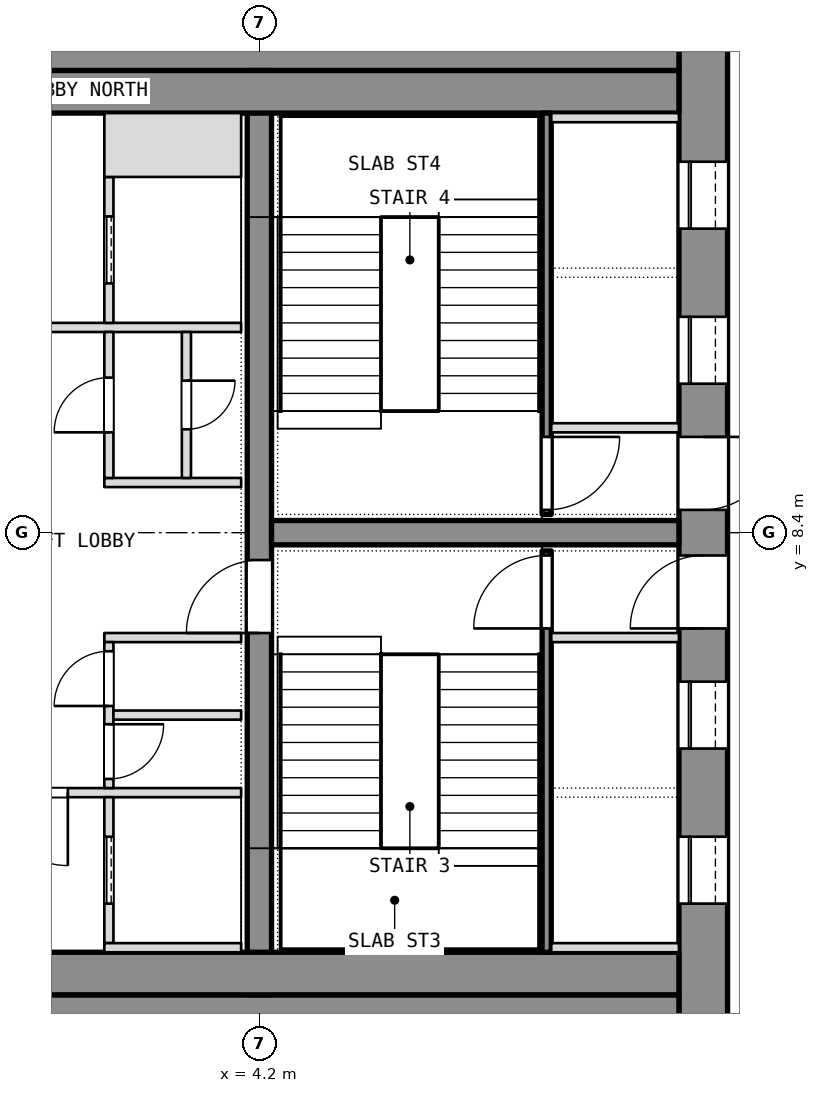
"""IFC4 building model, lengths in metres.
Left out: names, types, materials, properties, quantities, classifications, styles, units other than length and angle.
Written with IfcOpenShell. Run it as: python <this file> out.ifc"""

import sys

from ifc_helpers import new_model, si_unit, direction, frame, frame_2d, origin, place, context, subcontext, project, spatial, rectangle, extrude, element, fill, save


model = new_model("IFC4")
c1 = context("Model", 3, precision=1e-05, world=origin(), true_north=direction((0.0, 1.0)))
c2 = subcontext(c1, "Body", "Model", "MODEL_VIEW")
j1 = project(units=[si_unit("LENGTHUNIT", "METRE"), si_unit("PLANEANGLEUNIT", "RADIAN")], contexts=[c1])
p1 = place(None, origin())
s1 = spatial("IfcSite", under=j1, at=p1, CompositionType="ELEMENT")
p2 = place(p1, origin())
s2 = spatial("IfcBuilding", under=s1, at=p2, CompositionType="ELEMENT")
p3 = place(p2, frame((0.0, 0.0, 220.1)))
s3 = spatial("IfcBuildingStorey", under=s2, at=p3, CompositionType="ELEMENT", Elevation=220.1)
p4 = place(p3, frame((11.5, 0.0, 0.0), z_axis=(0.0, 0.0, 1.0), x_axis=(0.0, 1.0, 0.0)))
e1 = element("IfcWall", 1, at=p4, inside=s3, PredefinedType="SHEAR", context=c2, shape_type="SweptSolid", body=[
    extrude(rectangle(XDim=16.8, YDim=0.8, at=frame_2d((8.4, 0.0))), origin(), (0.0, 0.0, 1.0), 3.6),
])
p5 = place(p4, frame((2.3, 0.0, 0.0)))
e2 = element("IfcOpeningElement", 2, at=p5, cuts=e1, PredefinedType="OPENING", context=c2, shape_type="SweptSolid", body=[
    extrude(rectangle(XDim=1.1, YDim=2.1, at=frame_2d((0.55, 1.05))), frame((0.0, 0.4, 0.0), z_axis=(0.0, -1.0, 0.0), x_axis=(1.0, 0.0, 0.0)), (0.0, 0.0, 1.0), 0.8),
])
p6 = place(p4, frame((4.85, 0.0, 0.0)))
e3 = element("IfcOpeningElement", 3, at=p6, cuts=e1, PredefinedType="OPENING", context=c2, shape_type="SweptSolid", body=[
    extrude(rectangle(XDim=1.1, YDim=2.1, at=frame_2d((0.55, 1.05))), frame((0.0, 0.4, 0.0), z_axis=(0.0, -1.0, 0.0), x_axis=(1.0, 0.0, 0.0)), (0.0, 0.0, 1.0), 0.8),
])
p7 = place(p4, frame((6.825, 0.0, 0.0)))
e4 = element("IfcOpeningElement", 4, at=p7, cuts=e1, PredefinedType="OPENING", context=c2, shape_type="SweptSolid", body=[
    extrude(rectangle(XDim=1.2, YDim=2.1, at=frame_2d((0.6, 1.05))), frame((0.0, 0.4, 0.0), z_axis=(0.0, -1.0, 0.0), x_axis=(1.0, 0.0, 0.0)), (0.0, 0.0, 1.0), 0.8),
])
p8 = place(p4, frame((13.4, 0.0, 0.0)))
e5 = element("IfcOpeningElement", 5, at=p8, cuts=e1, PredefinedType="OPENING", context=c2, shape_type="SweptSolid", body=[
    extrude(rectangle(XDim=1.1, YDim=2.1, at=frame_2d((0.55, 1.05))), frame((0.0, 0.4, 0.0), z_axis=(0.0, -1.0, 0.0), x_axis=(1.0, 0.0, 0.0)), (0.0, 0.0, 1.0), 0.8),
])
p9 = place(p4, frame((10.85, 0.0, 0.0)))
e6 = element("IfcOpeningElement", 6, at=p9, cuts=e1, PredefinedType="OPENING", context=c2, shape_type="SweptSolid", body=[
    extrude(rectangle(XDim=1.1, YDim=2.1, at=frame_2d((0.55, 1.05))), frame((0.0, 0.4, 0.0), z_axis=(0.0, -1.0, 0.0), x_axis=(1.0, 0.0, 0.0)), (0.0, 0.0, 1.0), 0.8),
])
p10 = place(p4, frame((8.775, 0.0, 0.0)))
e7 = element("IfcOpeningElement", 7, at=p10, cuts=e1, PredefinedType="OPENING", context=c2, shape_type="SweptSolid", body=[
    extrude(rectangle(XDim=1.2, YDim=2.1, at=frame_2d((0.6, 1.05))), frame((0.0, 0.4, 0.0), z_axis=(0.0, -1.0, 0.0), x_axis=(1.0, 0.0, 0.0)), (0.0, 0.0, 1.0), 0.8),
])
for number, where, z_axis, x_axis in (
    (8, (-11.1, 0.4, 0.0), (0.0, 0.0, 1.0), (1.0, 0.0, 0.0)),
    (9, (-11.1, 16.4, 0.0), (0.0, 0.0, 1.0), (1.0, 0.0, 0.0)),
):
    element("IfcWall", number, at=place(p3, frame(where, z_axis=z_axis, x_axis=x_axis)), inside=s3, PredefinedType="SHEAR", context=c2, shape_type="SweptSolid", body=[
        extrude(rectangle(XDim=22.2, YDim=0.8, at=frame_2d((11.1, 0.0))), origin(), (0.0, 0.0, 1.0), 3.6),
    ])
p11 = place(p3, frame((4.2, 0.8, 0.0), z_axis=(0.0, 0.0, 1.0), x_axis=(0.0, 1.0, 0.0)))
e10 = element("IfcWall", 10, at=p11, inside=s3, PredefinedType="SHEAR", context=c2, shape_type="SweptSolid", body=[
    extrude(rectangle(XDim=15.2, YDim=0.4, at=frame_2d((7.6, 0.0))), origin(), (0.0, 0.0, 1.0), 3.6),
])
p12 = place(p11, frame((5.95, 0.0, 0.0)))
e11 = element("IfcOpeningElement", 11, at=p12, cuts=e10, PredefinedType="OPENING", context=c2, shape_type="SweptSolid", body=[
    extrude(rectangle(XDim=1.2, YDim=2.1, at=frame_2d((0.6, 1.05))), frame((0.0, 0.2, 0.0), z_axis=(0.0, -1.0, 0.0), x_axis=(1.0, 0.0, 0.0)), (0.0, 0.0, 1.0), 0.4),
])
p13 = place(p3, frame((4.4, 8.4, 0.0), z_axis=(0.0, 0.0, 1.0), x_axis=(1.0, 0.0, 0.0)))
e12 = element("IfcWall", 12, at=p13, inside=s3, PredefinedType="SHEAR", context=c2, shape_type="SweptSolid", body=[
    extrude(rectangle(XDim=6.7, YDim=0.4, at=frame_2d((3.35, 0.0))), origin(), (0.0, 0.0, 1.0), 3.6),
])
for number, where, z_axis, x_axis in (
    (13, (-11.1, 1.15, 0.0), (0.0, 0.0, 1.0), (1.0, 0.0, 0.0)),
    (14, (-11.1, 15.65, 0.0), (0.0, 0.0, 1.0), (1.0, 0.0, 0.0)),
):
    element("IfcWall", number, at=place(p3, frame(where, z_axis=z_axis, x_axis=x_axis)), inside=s3, PredefinedType="PARTITIONING", context=c2, shape_type="SweptSolid", body=[
        extrude(rectangle(XDim=22.2, YDim=0.7, at=frame_2d((11.1, 0.0))), origin(), (0.0, 0.0, 1.0), 3.34),
    ])
p14 = place(p3, frame((8.925, 1.5, 0.0), z_axis=(0.0, 0.0, 1.0), x_axis=(0.0, 1.0, 0.0)))
e15 = element("IfcWall", 15, at=p14, inside=s3, PredefinedType="SHEAR", context=c2, shape_type="SweptSolid", body=[
    extrude(rectangle(XDim=6.6, YDim=0.15, at=frame_2d((3.3, 0.0))), origin(), (0.0, 0.0, 1.0), 3.34),
])
p15 = place(p14, frame((5.325, 0.0, 0.0)))
e16 = element("IfcOpeningElement", 16, at=p15, cuts=e15, PredefinedType="OPENING", context=c2, shape_type="SweptSolid", body=[
    extrude(rectangle(XDim=1.2, YDim=2.1, at=frame_2d((0.6, 1.05))), frame((0.0, 0.075, 0.0), z_axis=(0.0, -1.0, 0.0), x_axis=(1.0, 0.0, 0.0)), (0.0, 0.0, 1.0), 0.15),
])
for number, where, z_axis, x_axis in (
    (17, (9.0, 6.675, 0.0), (0.0, 0.0, 1.0), (1.0, 0.0, 0.0)),
    (18, (9.0, 1.575, 0.0), (0.0, 0.0, 1.0), (1.0, 0.0, 0.0)),
):
    element("IfcWall", number, at=place(p3, frame(where, z_axis=z_axis, x_axis=x_axis)), inside=s3, PredefinedType="SHEAR", context=c2, shape_type="SweptSolid", body=[
        extrude(rectangle(XDim=2.1, YDim=0.15, at=frame_2d((1.05, 0.0))), origin(), (0.0, 0.0, 1.0), 3.6),
    ])
p16 = place(p3, frame((8.925, 8.7, 0.0), z_axis=(0.0, 0.0, 1.0), x_axis=(0.0, 1.0, 0.0)))
e19 = element("IfcWall", 19, at=p16, inside=s3, PredefinedType="SHEAR", context=c2, shape_type="SweptSolid", body=[
    extrude(rectangle(XDim=6.6, YDim=0.15, at=frame_2d((3.3, 0.0))), origin(), (0.0, 0.0, 1.0), 3.34),
])
p17 = place(p16, frame((0.075, 0.0, 0.0)))
e20 = element("IfcOpeningElement", 20, at=p17, cuts=e19, PredefinedType="OPENING", context=c2, shape_type="SweptSolid", body=[
    extrude(rectangle(XDim=1.2, YDim=2.1, at=frame_2d((0.6, 1.05))), frame((0.0, 0.075, 0.0), z_axis=(0.0, -1.0, 0.0), x_axis=(1.0, 0.0, 0.0)), (0.0, 0.0, 1.0), 0.15),
])
for number, where, z_axis, x_axis in (
    (21, (9.0, 10.125, 0.0), (0.0, 0.0, 1.0), (1.0, 0.0, 0.0)),
    (22, (9.0, 15.225, 0.0), (0.0, 0.0, 1.0), (1.0, 0.0, 0.0)),
):
    element("IfcWall", number, at=place(p3, frame(where, z_axis=z_axis, x_axis=x_axis)), inside=s3, PredefinedType="SHEAR", context=c2, shape_type="SweptSolid", body=[
        extrude(rectangle(XDim=2.1, YDim=0.15, at=frame_2d((1.05, 0.0))), origin(), (0.0, 0.0, 1.0), 3.6),
    ])
p18 = place(p3, frame((-3.9, 4.125, 0.0), z_axis=(0.0, 0.0, 1.0), x_axis=(1.0, 0.0, 0.0)))
e23 = element("IfcWall", 23, at=p18, inside=s3, PredefinedType="PARTITIONING", context=c2, shape_type="SweptSolid", body=[
    extrude(rectangle(XDim=7.8, YDim=0.15, at=frame_2d((3.9, 0.0))), origin(), (0.0, 0.0, 1.0), 3.34),
])
p19 = place(p18, frame((3.75, 0.0, 0.0)))
e24 = element("IfcOpeningElement", 24, at=p19, cuts=e23, PredefinedType="OPENING", context=c2, shape_type="SweptSolid", body=[
    extrude(rectangle(XDim=1.2, YDim=2.1, at=frame_2d((0.6, 1.05))), frame((0.0, 0.075, 0.0), z_axis=(0.0, -1.0, 0.0), x_axis=(1.0, 0.0, 0.0)), (0.0, 0.0, 1.0), 0.15),
])
p20 = place(p3, frame((-3.9, 11.775, 0.0), z_axis=(0.0, 0.0, 1.0), x_axis=(1.0, 0.0, 0.0)))
e25 = element("IfcWall", 25, at=p20, inside=s3, PredefinedType="PARTITIONING", context=c2, shape_type="SweptSolid", body=[
    extrude(rectangle(XDim=7.8, YDim=0.15, at=frame_2d((3.9, 0.0))), origin(), (0.0, 0.0, 1.0), 3.34),
])
p21 = place(p20, frame((3.3, 0.0, 0.0)))
e26 = element("IfcOpeningElement", 26, at=p21, cuts=e25, PredefinedType="OPENING", context=c2, shape_type="SweptSolid", body=[
    extrude(rectangle(XDim=1.2, YDim=2.1, at=frame_2d((0.6, 1.05))), frame((0.0, 0.075, 0.0), z_axis=(0.0, -1.0, 0.0), x_axis=(1.0, 0.0, 0.0)), (0.0, 0.0, 1.0), 0.15),
])
p22 = place(p3, frame((1.725, 1.65, 0.0), z_axis=(0.0, 0.0, 1.0), x_axis=(0.0, 1.0, 0.0)))
e27 = element("IfcWall", 27, at=p22, inside=s3, PredefinedType="SHEAR", context=c2, shape_type="SweptSolid", body=[
    extrude(rectangle(XDim=2.4, YDim=0.15, at=frame_2d((1.2, 0.0))), origin(), (0.0, 0.0, 1.0), 3.6),
])
p23 = place(p22, frame((0.65, 0.0, 0.0)))
e28 = element("IfcOpeningElement", 28, at=p23, cuts=e27, PredefinedType="OPENING", context=c2, shape_type="SweptSolid", body=[
    extrude(rectangle(XDim=1.1, YDim=2.1, at=frame_2d((0.55, 1.05))), frame((0.0, 0.075, 0.0), z_axis=(0.0, -1.0, 0.0), x_axis=(1.0, 0.0, 0.0)), (0.0, 0.0, 1.0), 0.15),
])
p24 = place(p3, frame((1.65, 1.575, 0.0), z_axis=(0.0, 0.0, 1.0), x_axis=(1.0, 0.0, 0.0)))
e29 = element("IfcWall", 29, at=p24, inside=s3, PredefinedType="SHEAR", context=c2, shape_type="SweptSolid", body=[
    extrude(rectangle(XDim=2.25, YDim=0.15, at=frame_2d((1.125, 0.0))), origin(), (0.0, 0.0, 1.0), 3.6),
])
p25 = place(p3, frame((1.725, 11.85, 0.0), z_axis=(0.0, 0.0, 1.0), x_axis=(0.0, 1.0, 0.0)))
e30 = element("IfcWall", 30, at=p25, inside=s3, PredefinedType="SHEAR", context=c2, shape_type="SweptSolid", body=[
    extrude(rectangle(XDim=2.4, YDim=0.15, at=frame_2d((1.2, 0.0))), origin(), (0.0, 0.0, 1.0), 3.6),
])
p26 = place(p25, frame((0.65, 0.0, 0.0)))
e31 = element("IfcOpeningElement", 31, at=p26, cuts=e30, PredefinedType="OPENING", context=c2, shape_type="SweptSolid", body=[
    extrude(rectangle(XDim=1.1, YDim=2.1, at=frame_2d((0.55, 1.05))), frame((0.0, 0.075, 0.0), z_axis=(0.0, -1.0, 0.0), x_axis=(1.0, 0.0, 0.0)), (0.0, 0.0, 1.0), 0.15),
])
p27 = place(p3, frame((1.65, 14.775, 0.0), z_axis=(0.0, 0.0, 1.0), x_axis=(1.0, 0.0, 0.0)))
e32 = element("IfcWall", 32, at=p27, inside=s3, PredefinedType="SHEAR", context=c2, shape_type="SweptSolid", body=[
    extrude(rectangle(XDim=2.25, YDim=1.05, at=frame_2d((1.125, 0.0))), origin(), (0.0, 0.0, 1.0), 3.6),
])
for number, where, z_axis, x_axis in (
    (33, (1.65, 6.675, 0.0), (0.0, 0.0, 1.0), (1.0, 0.0, 0.0)),
    (34, (1.65, 9.225, 0.0), (0.0, 0.0, 1.0), (1.0, 0.0, 0.0)),
):
    element("IfcWall", number, at=place(p3, frame(where, z_axis=z_axis, x_axis=x_axis)), inside=s3, PredefinedType="PARTITIONING", context=c2, shape_type="SweptSolid", body=[
        extrude(rectangle(XDim=2.25, YDim=0.15, at=frame_2d((1.125, 0.0))), origin(), (0.0, 0.0, 1.0), 3.34),
    ])
p28 = place(p3, frame((1.725, 4.2, 0.0), z_axis=(0.0, 0.0, 1.0), x_axis=(0.0, 1.0, 0.0)))
e35 = element("IfcWall", 35, at=p28, inside=s3, PredefinedType="PARTITIONING", context=c2, shape_type="SweptSolid", body=[
    extrude(rectangle(XDim=2.4, YDim=0.15, at=frame_2d((1.2, 0.0))), origin(), (0.0, 0.0, 1.0), 3.34),
])
p29 = place(p28, frame((0.15, 0.0, 0.0)))
e36 = element("IfcOpeningElement", 36, at=p29, cuts=e35, PredefinedType="OPENING", context=c2, shape_type="SweptSolid", body=[
    extrude(rectangle(XDim=0.9, YDim=2.1, at=frame_2d((0.45, 1.05))), frame((0.0, 0.075, 0.0), z_axis=(0.0, -1.0, 0.0), x_axis=(1.0, 0.0, 0.0)), (0.0, 0.0, 1.0), 0.15),
])
p30 = place(p28, frame((1.35, 0.0, 0.0)))
e37 = element("IfcOpeningElement", 37, at=p30, cuts=e35, PredefinedType="OPENING", context=c2, shape_type="SweptSolid", body=[
    extrude(rectangle(XDim=0.9, YDim=2.1, at=frame_2d((0.45, 1.05))), frame((0.0, 0.075, 0.0), z_axis=(0.0, -1.0, 0.0), x_axis=(1.0, 0.0, 0.0)), (0.0, 0.0, 1.0), 0.15),
])
p31 = place(p3, frame((1.725, 9.3, 0.0), z_axis=(0.0, 0.0, 1.0), x_axis=(0.0, 1.0, 0.0)))
e38 = element("IfcWall", 38, at=p31, inside=s3, PredefinedType="PARTITIONING", context=c2, shape_type="SweptSolid", body=[
    extrude(rectangle(XDim=2.4, YDim=0.15, at=frame_2d((1.2, 0.0))), origin(), (0.0, 0.0, 1.0), 3.34),
])
p32 = place(p31, frame((0.75, 0.0, 0.0)))
e39 = element("IfcOpeningElement", 39, at=p32, cuts=e38, PredefinedType="OPENING", context=c2, shape_type="SweptSolid", body=[
    extrude(rectangle(XDim=0.9, YDim=2.1, at=frame_2d((0.45, 1.05))), frame((0.0, 0.075, 0.0), z_axis=(0.0, -1.0, 0.0), x_axis=(1.0, 0.0, 0.0)), (0.0, 0.0, 1.0), 0.15),
])
p33 = place(p3, frame((1.8, 5.4, 0.0), z_axis=(0.0, 0.0, 1.0), x_axis=(1.0, 0.0, 0.0)))
e40 = element("IfcWall", 40, at=p33, inside=s3, PredefinedType="PARTITIONING", context=c2, shape_type="SweptSolid", body=[
    extrude(rectangle(XDim=2.1, YDim=0.15, at=frame_2d((1.05, 0.0))), origin(), (0.0, 0.0, 1.0), 3.34),
])
p34 = place(p3, frame((3.0, 9.3, 0.0), z_axis=(0.0, 0.0, 1.0), x_axis=(0.0, 1.0, 0.0)))
e41 = element("IfcWall", 41, at=p34, inside=s3, PredefinedType="PARTITIONING", context=c2, shape_type="SweptSolid", body=[
    extrude(rectangle(XDim=2.4, YDim=0.15, at=frame_2d((1.2, 0.0))), origin(), (0.0, 0.0, 1.0), 3.34),
])
p35 = place(p34, frame((0.8, 0.0, 0.0)))
e42 = element("IfcOpeningElement", 42, at=p35, cuts=e41, PredefinedType="OPENING", context=c2, shape_type="SweptSolid", body=[
    extrude(rectangle(XDim=0.8, YDim=2.1, at=frame_2d((0.4, 1.05))), frame((0.0, 0.075, 0.0), z_axis=(0.0, -1.0, 0.0), x_axis=(1.0, 0.0, 0.0)), (0.0, 0.0, 1.0), 0.15),
])
p36 = place(p5, origin())
e43 = element("IfcDoor", 43, at=p36, inside=s3, OperationType="SLIDING_TO_LEFT", PredefinedType="DOOR", context=c2, shape_type="SweptSolid", body=[
    extrude(rectangle(XDim=1.1, YDim=2.1, at=frame_2d((0.55, 1.05))), frame((0.0, 0.025, 0.0), z_axis=(0.0, -1.0, 0.0), x_axis=(1.0, 0.0, 0.0)), (0.0, 0.0, 1.0), 0.05),
])
fill(e2, e43)
p37 = place(p6, origin())
e44 = element("IfcDoor", 44, at=p37, inside=s3, OperationType="SLIDING_TO_LEFT", PredefinedType="DOOR", context=c2, shape_type="SweptSolid", body=[
    extrude(rectangle(XDim=1.1, YDim=2.1, at=frame_2d((0.55, 1.05))), frame((0.0, 0.025, 0.0), z_axis=(0.0, -1.0, 0.0), x_axis=(1.0, 0.0, 0.0)), (0.0, 0.0, 1.0), 0.05),
])
fill(e3, e44)
p38 = place(p7, origin())
e45 = element("IfcDoor", 45, at=p38, inside=s3, OperationType="SINGLE_SWING_LEFT", PredefinedType="DOOR", context=c2, shape_type="SweptSolid", body=[
    extrude(rectangle(XDim=1.2, YDim=2.1, at=frame_2d((0.6, 1.05))), frame((0.0, 0.025, 0.0), z_axis=(0.0, -1.0, 0.0), x_axis=(1.0, 0.0, 0.0)), (0.0, 0.0, 1.0), 0.05),
])
fill(e4, e45)
p39 = place(p15, origin())
e46 = element("IfcDoor", 46, at=p39, inside=s3, OperationType="SINGLE_SWING_LEFT", PredefinedType="DOOR", context=c2, shape_type="SweptSolid", body=[
    extrude(rectangle(XDim=1.2, YDim=2.1, at=frame_2d((0.6, 1.05))), frame((0.0, 0.025, 0.0), z_axis=(0.0, -1.0, 0.0), x_axis=(1.0, 0.0, 0.0)), (0.0, 0.0, 1.0), 0.05),
])
fill(e16, e46)
p40 = place(p8, origin())
e47 = element("IfcDoor", 47, at=p40, inside=s3, OperationType="SLIDING_TO_LEFT", PredefinedType="DOOR", context=c2, shape_type="SweptSolid", body=[
    extrude(rectangle(XDim=1.1, YDim=2.1, at=frame_2d((0.55, 1.05))), frame((0.0, 0.025, 0.0), z_axis=(0.0, -1.0, 0.0), x_axis=(1.0, 0.0, 0.0)), (0.0, 0.0, 1.0), 0.05),
])
fill(e5, e47)
p41 = place(p9, origin())
e48 = element("IfcDoor", 48, at=p41, inside=s3, OperationType="SLIDING_TO_LEFT", PredefinedType="DOOR", context=c2, shape_type="SweptSolid", body=[
    extrude(rectangle(XDim=1.1, YDim=2.1, at=frame_2d((0.55, 1.05))), frame((0.0, 0.025, 0.0), z_axis=(0.0, -1.0, 0.0), x_axis=(1.0, 0.0, 0.0)), (0.0, 0.0, 1.0), 0.05),
])
fill(e6, e48)
p42 = place(p10, origin())
e49 = element("IfcDoor", 49, at=p42, inside=s3, OperationType="SINGLE_SWING_LEFT", PredefinedType="DOOR", context=c2, shape_type="SweptSolid", body=[
    extrude(rectangle(XDim=1.2, YDim=2.1, at=frame_2d((0.6, 1.05))), frame((0.0, 0.025, 0.0), z_axis=(0.0, -1.0, 0.0), x_axis=(1.0, 0.0, 0.0)), (0.0, 0.0, 1.0), 0.05),
])
fill(e7, e49)
p43 = place(p17, origin())
e50 = element("IfcDoor", 50, at=p43, inside=s3, OperationType="SINGLE_SWING_LEFT", PredefinedType="DOOR", context=c2, shape_type="SweptSolid", body=[
    extrude(rectangle(XDim=1.2, YDim=2.1, at=frame_2d((0.6, 1.05))), frame((0.0, 0.025, 0.0), z_axis=(0.0, -1.0, 0.0), x_axis=(1.0, 0.0, 0.0)), (0.0, 0.0, 1.0), 0.05),
])
fill(e20, e50)
p44 = place(p29, origin())
e51 = element("IfcDoor", 51, at=p44, inside=s3, OperationType="SINGLE_SWING_LEFT", PredefinedType="DOOR", context=c2, shape_type="SweptSolid", body=[
    extrude(rectangle(XDim=0.9, YDim=2.1, at=frame_2d((0.45, 1.05))), frame((0.0, 0.025, 0.0), z_axis=(0.0, -1.0, 0.0), x_axis=(1.0, 0.0, 0.0)), (0.0, 0.0, 1.0), 0.05),
])
fill(e36, e51)
p45 = place(p30, origin())
e52 = element("IfcDoor", 52, at=p45, inside=s3, OperationType="SINGLE_SWING_LEFT", PredefinedType="DOOR", context=c2, shape_type="SweptSolid", body=[
    extrude(rectangle(XDim=0.9, YDim=2.1, at=frame_2d((0.45, 1.05))), frame((0.0, 0.025, 0.0), z_axis=(0.0, -1.0, 0.0), x_axis=(1.0, 0.0, 0.0)), (0.0, 0.0, 1.0), 0.05),
])
fill(e37, e52)
p46 = place(p32, origin())
e53 = element("IfcDoor", 53, at=p46, inside=s3, OperationType="SINGLE_SWING_LEFT", PredefinedType="DOOR", context=c2, shape_type="SweptSolid", body=[
    extrude(rectangle(XDim=0.9, YDim=2.1, at=frame_2d((0.45, 1.05))), frame((0.0, 0.025, 0.0), z_axis=(0.0, -1.0, 0.0), x_axis=(1.0, 0.0, 0.0)), (0.0, 0.0, 1.0), 0.05),
])
fill(e39, e53)
p47 = place(p35, origin())
e54 = element("IfcDoor", 54, at=p47, inside=s3, OperationType="SINGLE_SWING_LEFT", PredefinedType="DOOR", context=c2, shape_type="SweptSolid", body=[
    extrude(rectangle(XDim=0.8, YDim=2.1, at=frame_2d((0.4, 1.05))), frame((0.0, 0.025, 0.0), z_axis=(0.0, -1.0, 0.0), x_axis=(1.0, 0.0, 0.0)), (0.0, 0.0, 1.0), 0.05),
])
fill(e42, e54)
p48 = place(p23, origin())
e55 = element("IfcDoor", 55, at=p48, inside=s3, OperationType="SLIDING_TO_LEFT", PredefinedType="DOOR", context=c2, shape_type="SweptSolid", body=[
    extrude(rectangle(XDim=1.1, YDim=2.1, at=frame_2d((0.55, 1.05))), frame((0.0, 0.025, 0.0), z_axis=(0.0, -1.0, 0.0), x_axis=(1.0, 0.0, 0.0)), (0.0, 0.0, 1.0), 0.05),
])
fill(e28, e55)
p49 = place(p26, origin())
e56 = element("IfcDoor", 56, at=p49, inside=s3, OperationType="SLIDING_TO_LEFT", PredefinedType="DOOR", context=c2, shape_type="SweptSolid", body=[
    extrude(rectangle(XDim=1.1, YDim=2.1, at=frame_2d((0.55, 1.05))), frame((0.0, 0.025, 0.0), z_axis=(0.0, -1.0, 0.0), x_axis=(1.0, 0.0, 0.0)), (0.0, 0.0, 1.0), 0.05),
])
fill(e31, e56)
p50 = place(p19, origin())
e57 = element("IfcDoor", 57, at=p50, inside=s3, OperationType="SINGLE_SWING_LEFT", PredefinedType="DOOR", context=c2, shape_type="SweptSolid", body=[
    extrude(rectangle(XDim=1.2, YDim=2.1, at=frame_2d((0.6, 1.05))), frame((0.0, 0.025, 0.0), z_axis=(0.0, -1.0, 0.0), x_axis=(1.0, 0.0, 0.0)), (0.0, 0.0, 1.0), 0.05),
])
fill(e24, e57)
p51 = place(p12, origin())
e58 = element("IfcDoor", 58, at=p51, inside=s3, OperationType="SINGLE_SWING_LEFT", PredefinedType="DOOR", context=c2, shape_type="SweptSolid", body=[
    extrude(rectangle(XDim=1.2, YDim=2.1, at=frame_2d((0.6, 1.05))), frame((0.0, 0.025, 0.0), z_axis=(0.0, -1.0, 0.0), x_axis=(1.0, 0.0, 0.0)), (0.0, 0.0, 1.0), 0.05),
])
fill(e11, e58)
save(model, sys.argv[1])
